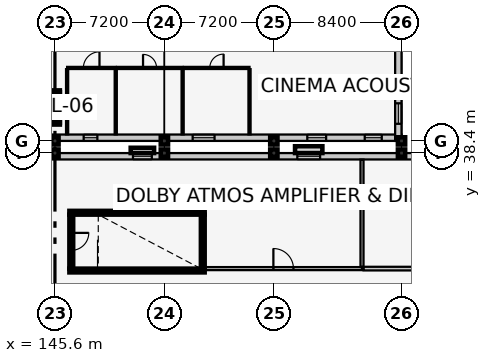
"""IFC4 building model, lengths in metres.
Left out: names, types, materials, properties, quantities, classifications, styles, units other than length and angle.
Written with IfcOpenShell. Run it as: python <this file> out.ifc"""

import sys

from ifc_helpers import new_model, si_unit, direction, frame, frame_2d, origin, origin_2d, place, context, subcontext, project, spatial, rectangle, extrude, element, fill, save


model = new_model("IFC4")
c1 = context("Model", 3, precision=1e-05, world=origin(), true_north=direction((0.0, 1.0)))
c2 = subcontext(c1, "Body", "Model", "MODEL_VIEW")
j1 = project(units=[si_unit("LENGTHUNIT", "METRE"), si_unit("PLANEANGLEUNIT", "RADIAN")], contexts=[c1])
p1 = place(None, origin())
s1 = spatial("IfcSite", under=j1, at=p1, CompositionType="ELEMENT")
p2 = place(p1, origin())
s2 = spatial("IfcBuilding", under=s1, at=p2, CompositionType="ELEMENT")
p3 = place(p2, frame((0.0, 0.0, 9.6)))
s3 = spatial("IfcBuildingStorey", under=s2, at=p3, CompositionType="ELEMENT", Elevation=9.6)
for number, where, z_axis, x_axis in (
    (1, (145.6, 38.4, 0.0), (0.0, 0.0, 1.0), (1.0, 0.0, 0.0)),
    (2, (152.8, 38.4, 0.0), (0.0, 0.0, 1.0), (1.0, 0.0, 0.0)),
    (3, (160.0, 38.4, 0.0), (0.0, 0.0, 1.0), (1.0, 0.0, 0.0)),
    (4, (168.4, 38.4, 0.0), (0.0, 0.0, 1.0), (1.0, 0.0, 0.0)),
    (5, (145.6, 39.2, 0.0), (0.0, 0.0, 1.0), (1.0, 0.0, 0.0)),
    (6, (152.8, 39.2, 0.0), (0.0, 0.0, 1.0), (1.0, 0.0, 0.0)),
    (7, (160.0, 39.2, 0.0), (0.0, 0.0, 1.0), (1.0, 0.0, 0.0)),
    (8, (168.4, 39.2, 0.0), (0.0, 0.0, 1.0), (1.0, 0.0, 0.0)),
):
    element("IfcColumn", number, at=place(p3, frame(where, z_axis=z_axis, x_axis=x_axis)), inside=s3, PredefinedType="COLUMN", context=c2, shape_type="SweptSolid", body=[
        extrude(rectangle(XDim=0.48, YDim=0.48, at=origin_2d()), origin(), (0.0, 0.0, 1.0), 4.2),
    ])
p4 = place(p3, frame((124.0, 38.19, 0.0), z_axis=(0.0, 0.0, 1.0), x_axis=(1.0, 0.0, 0.0)))
e9 = element("IfcWall", 9, at=p4, inside=s3, PredefinedType="SOLIDWALL", context=c2, shape_type="SweptSolid", body=[
    extrude(rectangle(XDim=62.0, YDim=0.42, at=frame_2d((31.0, 0.0))), origin(), (0.0, 0.0, 1.0), 3.675),
])
p5 = place(p4, frame((1.299, 0.0, 0.9)))
e10 = element("IfcOpeningElement", 10, at=p5, cuts=e9, PredefinedType="OPENING", context=c2, shape_type="SweptSolid", body=[
    extrude(rectangle(XDim=1.05, YDim=1.6, at=frame_2d((0.525, 0.8))), frame((0.0, 0.222, 0.0), z_axis=(0.0, -1.0, 0.0), x_axis=(1.0, 0.0, 0.0)), (0.0, 0.0, 1.0), 0.444),
])
p6 = place(p4, frame((4.896, 0.0, 0.9)))
e11 = element("IfcOpeningElement", 11, at=p6, cuts=e9, PredefinedType="OPENING", context=c2, shape_type="SweptSolid", body=[
    extrude(rectangle(XDim=1.15, YDim=1.6, at=frame_2d((0.575, 0.8))), frame((0.0, 0.222, 0.0), z_axis=(0.0, -1.0, 0.0), x_axis=(1.0, 0.0, 0.0)), (0.0, 0.0, 1.0), 0.444),
])
p7 = place(p4, frame((8.493, 0.0, 0.9)))
e12 = element("IfcOpeningElement", 12, at=p7, cuts=e9, PredefinedType="OPENING", context=c2, shape_type="SweptSolid", body=[
    extrude(rectangle(XDim=1.25, YDim=1.6, at=frame_2d((0.625, 0.8))), frame((0.0, 0.222, 0.0), z_axis=(0.0, -1.0, 0.0), x_axis=(1.0, 0.0, 0.0)), (0.0, 0.0, 1.0), 0.444),
])
p8 = place(p4, frame((12.075, 0.0, 0.9)))
e13 = element("IfcOpeningElement", 13, at=p8, cuts=e9, PredefinedType="OPENING", context=c2, shape_type="SweptSolid", body=[
    extrude(rectangle(XDim=1.38, YDim=1.6, at=frame_2d((0.69, 0.8))), frame((0.0, 0.222, 0.0), z_axis=(0.0, -1.0, 0.0), x_axis=(1.0, 0.0, 0.0)), (0.0, 0.0, 1.0), 0.444),
])
p9 = place(p4, frame((15.662, 0.0, 0.9)))
e14 = element("IfcOpeningElement", 14, at=p9, cuts=e9, PredefinedType="OPENING", context=c2, shape_type="SweptSolid", body=[
    extrude(rectangle(XDim=1.5, YDim=1.6, at=frame_2d((0.75, 0.8))), frame((0.0, 0.222, 0.0), z_axis=(0.0, -1.0, 0.0), x_axis=(1.0, 0.0, 0.0)), (0.0, 0.0, 1.0), 0.444),
])
p10 = place(p4, frame((19.559, 0.0, 0.9)))
e15 = element("IfcOpeningElement", 15, at=p10, cuts=e9, PredefinedType="OPENING", context=c2, shape_type="SweptSolid", body=[
    extrude(rectangle(XDim=1.0, YDim=1.75, at=frame_2d((0.5, 0.875))), frame((0.0, 0.222, 0.0), z_axis=(0.0, -1.0, 0.0), x_axis=(1.0, 0.0, 0.0)), (0.0, 0.0, 1.0), 0.444),
])
p11 = place(p4, frame((26.733, 0.0, 0.9)))
e16 = element("IfcOpeningElement", 16, at=p11, cuts=e9, PredefinedType="OPENING", context=c2, shape_type="SweptSolid", body=[
    extrude(rectangle(XDim=1.24, YDim=1.75, at=frame_2d((0.62, 0.875))), frame((0.0, 0.222, 0.0), z_axis=(0.0, -1.0, 0.0), x_axis=(1.0, 0.0, 0.0)), (0.0, 0.0, 1.0), 0.444),
])
p12 = place(p4, frame((37.544, 0.0, 0.9)))
e17 = element("IfcOpeningElement", 17, at=p12, cuts=e9, PredefinedType="OPENING", context=c2, shape_type="SweptSolid", body=[
    extrude(rectangle(XDim=1.5, YDim=1.75, at=frame_2d((0.75, 0.875))), frame((0.0, 0.222, 0.0), z_axis=(0.0, -1.0, 0.0), x_axis=(1.0, 0.0, 0.0)), (0.0, 0.0, 1.0), 0.444),
])
p13 = place(p4, frame((48.685, 0.0, 0.9)))
e18 = element("IfcOpeningElement", 18, at=p13, cuts=e9, PredefinedType="OPENING", context=c2, shape_type="SweptSolid", body=[
    extrude(rectangle(XDim=1.1, YDim=1.35, at=frame_2d((0.55, 0.675))), frame((0.0, 0.222, 0.0), z_axis=(0.0, -1.0, 0.0), x_axis=(1.0, 0.0, 0.0)), (0.0, 0.0, 1.0), 0.444),
])
p14 = place(p4, frame((59.477, 0.0, 0.9)))
e19 = element("IfcOpeningElement", 19, at=p14, cuts=e9, PredefinedType="OPENING", context=c2, shape_type="SweptSolid", body=[
    extrude(rectangle(XDim=1.4, YDim=1.35, at=frame_2d((0.7, 0.675))), frame((0.0, 0.222, 0.0), z_axis=(0.0, -1.0, 0.0), x_axis=(1.0, 0.0, 0.0)), (0.0, 0.0, 1.0), 0.444),
])
p15 = place(p3, frame((168.4, 39.41, 0.0), z_axis=(0.0, 0.0, 1.0), x_axis=(-1.0, 0.0, 0.0)))
e20 = element("IfcWall", 20, at=p15, inside=s3, PredefinedType="SOLIDWALL", context=c2, shape_type="SweptSolid", body=[
    extrude(rectangle(XDim=37.2, YDim=0.42, at=frame_2d((18.6, 0.0))), origin(), (0.0, 0.0, 1.0), 3.115),
])
p16 = place(p15, frame((1.3, 0.0, 0.9)))
e21 = element("IfcOpeningElement", 21, at=p16, cuts=e20, PredefinedType="OPENING", context=c2, shape_type="SweptSolid", body=[
    extrude(rectangle(XDim=1.12, YDim=1.75, at=frame_2d((0.56, 0.875))), frame((0.0, 0.222, 0.0), z_axis=(0.0, -1.0, 0.0), x_axis=(1.0, 0.0, 0.0)), (0.0, 0.0, 1.0), 0.444),
])
p17 = place(p15, frame((4.96, 0.0, 0.9)))
e22 = element("IfcOpeningElement", 22, at=p17, cuts=e20, PredefinedType="OPENING", context=c2, shape_type="SweptSolid", body=[
    extrude(rectangle(XDim=1.24, YDim=1.75, at=frame_2d((0.62, 0.875))), frame((0.0, 0.222, 0.0), z_axis=(0.0, -1.0, 0.0), x_axis=(1.0, 0.0, 0.0)), (0.0, 0.0, 1.0), 0.444),
])
p18 = place(p15, frame((12.3, 0.0, 0.9)))
e23 = element("IfcOpeningElement", 23, at=p18, cuts=e20, PredefinedType="OPENING", context=c2, shape_type="SweptSolid", body=[
    extrude(rectangle(XDim=1.44, YDim=1.75, at=frame_2d((0.72, 0.875))), frame((0.0, 0.222, 0.0), z_axis=(0.0, -1.0, 0.0), x_axis=(1.0, 0.0, 0.0)), (0.0, 0.0, 1.0), 0.444),
])
p19 = place(p15, frame((20.01, 0.0, 0.9)))
e24 = element("IfcOpeningElement", 24, at=p19, cuts=e20, PredefinedType="OPENING", context=c2, shape_type="SweptSolid", body=[
    extrude(rectangle(XDim=0.9, YDim=1.35, at=frame_2d((0.45, 0.675))), frame((0.0, 0.222, 0.0), z_axis=(0.0, -1.0, 0.0), x_axis=(1.0, 0.0, 0.0)), (0.0, 0.0, 1.0), 0.444),
])
p20 = place(p15, frame((23.68, 0.0, 0.9)))
e25 = element("IfcOpeningElement", 25, at=p20, cuts=e20, PredefinedType="OPENING", context=c2, shape_type="SweptSolid", body=[
    extrude(rectangle(XDim=1.0, YDim=1.35, at=frame_2d((0.5, 0.675))), frame((0.0, 0.222, 0.0), z_axis=(0.0, -1.0, 0.0), x_axis=(1.0, 0.0, 0.0)), (0.0, 0.0, 1.0), 0.444),
])
p21 = place(p15, frame((27.35, 0.0, 0.9)))
e26 = element("IfcOpeningElement", 26, at=p21, cuts=e20, PredefinedType="OPENING", context=c2, shape_type="SweptSolid", body=[
    extrude(rectangle(XDim=1.1, YDim=1.35, at=frame_2d((0.55, 0.675))), frame((0.0, 0.222, 0.0), z_axis=(0.0, -1.0, 0.0), x_axis=(1.0, 0.0, 0.0)), (0.0, 0.0, 1.0), 0.444),
])
p22 = place(p15, frame((31.02, 0.0, 0.9)))
e27 = element("IfcOpeningElement", 27, at=p22, cuts=e20, PredefinedType="OPENING", context=c2, shape_type="SweptSolid", body=[
    extrude(rectangle(XDim=1.2, YDim=1.35, at=frame_2d((0.6, 0.675))), frame((0.0, 0.222, 0.0), z_axis=(0.0, -1.0, 0.0), x_axis=(1.0, 0.0, 0.0)), (0.0, 0.0, 1.0), 0.444),
])
p23 = place(p15, frame((34.69, 0.0, 0.9)))
e28 = element("IfcOpeningElement", 28, at=p23, cuts=e20, PredefinedType="OPENING", context=c2, shape_type="SweptSolid", body=[
    extrude(rectangle(XDim=1.3, YDim=1.35, at=frame_2d((0.65, 0.675))), frame((0.0, 0.222, 0.0), z_axis=(0.0, -1.0, 0.0), x_axis=(1.0, 0.0, 0.0)), (0.0, 0.0, 1.0), 0.444),
])
p24 = place(p3, frame((168.19, 60.8, 0.0), z_axis=(0.0, 0.0, 1.0), x_axis=(0.0, -1.0, 0.0)))
e29 = element("IfcWall", 29, at=p24, inside=s3, PredefinedType="SOLIDWALL", context=c2, shape_type="SweptSolid", body=[
    extrude(rectangle(XDim=21.6, YDim=0.42, at=frame_2d((10.8, 0.0))), origin(), (0.0, 0.0, 1.0), 3.355),
])
p25 = place(p24, frame((1.1, 0.0, 0.9)))
e30 = element("IfcOpeningElement", 30, at=p25, cuts=e29, PredefinedType="OPENING", context=c2, shape_type="SweptSolid", body=[
    extrude(rectangle(XDim=1.4, YDim=1.35, at=frame_2d((0.7, 0.675))), frame((0.0, 0.222, 0.0), z_axis=(0.0, -1.0, 0.0), x_axis=(1.0, 0.0, 0.0)), (0.0, 0.0, 1.0), 0.444),
])
p26 = place(p24, frame((4.925, 0.0, 0.9)))
e31 = element("IfcOpeningElement", 31, at=p26, cuts=e29, PredefinedType="OPENING", context=c2, shape_type="SweptSolid", body=[
    extrude(rectangle(XDim=0.95, YDim=1.45, at=frame_2d((0.475, 0.725))), frame((0.0, 0.222, 0.0), z_axis=(0.0, -1.0, 0.0), x_axis=(1.0, 0.0, 0.0)), (0.0, 0.0, 1.0), 0.444),
])
p27 = place(p24, frame((8.475, 0.0, 0.9)))
e32 = element("IfcOpeningElement", 32, at=p27, cuts=e29, PredefinedType="OPENING", context=c2, shape_type="SweptSolid", body=[
    extrude(rectangle(XDim=1.05, YDim=1.45, at=frame_2d((0.525, 0.725))), frame((0.0, 0.222, 0.0), z_axis=(0.0, -1.0, 0.0), x_axis=(1.0, 0.0, 0.0)), (0.0, 0.0, 1.0), 0.444),
])
p28 = place(p24, frame((12.025, 0.0, 0.9)))
e33 = element("IfcOpeningElement", 33, at=p28, cuts=e29, PredefinedType="OPENING", context=c2, shape_type="SweptSolid", body=[
    extrude(rectangle(XDim=1.15, YDim=1.45, at=frame_2d((0.575, 0.725))), frame((0.0, 0.222, 0.0), z_axis=(0.0, -1.0, 0.0), x_axis=(1.0, 0.0, 0.0)), (0.0, 0.0, 1.0), 0.444),
])
p29 = place(p24, frame((19.125, 0.0, 0.9)))
e34 = element("IfcOpeningElement", 34, at=p29, cuts=e29, PredefinedType="OPENING", context=c2, shape_type="SweptSolid", body=[
    extrude(rectangle(XDim=1.35, YDim=1.45, at=frame_2d((0.675, 0.725))), frame((0.0, 0.222, 0.0), z_axis=(0.0, -1.0, 0.0), x_axis=(1.0, 0.0, 0.0)), (0.0, 0.0, 1.0), 0.444),
])
for number, where, z_axis, x_axis in (
    (35, (146.55, 30.675, 0.0), (0.0, 0.0, 1.0), (1.0, 0.0, 0.0)),
    (36, (155.45, 34.475, 0.0), (0.0, 0.0, 1.0), (-1.0, 0.0, 0.0)),
):
    element("IfcWall", number, at=place(p3, frame(where, z_axis=z_axis, x_axis=x_axis)), inside=s3, PredefinedType="SHEAR", context=c2, shape_type="SweptSolid", body=[
        extrude(rectangle(XDim=8.9, YDim=0.25, at=frame_2d((4.45, 0.0))), origin(), (0.0, 0.0, 1.0), 3.95),
    ])
p30 = place(p3, frame((146.675, 34.35, 0.0), z_axis=(0.0, 0.0, 1.0), x_axis=(0.0, -1.0, 0.0)))
e37 = element("IfcWall", 37, at=p30, inside=s3, PredefinedType="SHEAR", context=c2, shape_type="SweptSolid", body=[
    extrude(rectangle(XDim=3.55, YDim=0.25, at=frame_2d((1.775, 0.0))), origin(), (0.0, 0.0, 1.0), 3.95),
])
p31 = place(p30, frame((1.2, 0.0, 0.0)))
e38 = element("IfcOpeningElement", 38, at=p31, cuts=e37, PredefinedType="OPENING", context=c2, shape_type="SweptSolid", body=[
    extrude(rectangle(XDim=1.15, YDim=2.15, at=frame_2d((0.575, 1.075))), frame((0.0, 0.137, 0.0), z_axis=(0.0, -1.0, 0.0), x_axis=(1.0, 0.0, 0.0)), (0.0, 0.0, 1.0), 0.274),
])
p32 = place(p3, frame((155.325, 30.8, 0.0), z_axis=(0.0, 0.0, 1.0), x_axis=(0.0, 1.0, 0.0)))
e39 = element("IfcWall", 39, at=p32, inside=s3, PredefinedType="SHEAR", context=c2, shape_type="SweptSolid", body=[
    extrude(rectangle(XDim=3.55, YDim=0.25, at=frame_2d((1.775, 0.0))), origin(), (0.0, 0.0, 1.0), 3.95),
])
p33 = place(p3, frame((143.875, 40.4, 0.0), z_axis=(0.0, 0.0, 1.0), x_axis=(1.0, 0.0, 0.0)))
e40 = element("IfcWall", 40, at=p33, inside=s3, PredefinedType="SHEAR", context=c2, shape_type="SweptSolid", body=[
    extrude(rectangle(XDim=2.05, YDim=0.25, at=frame_2d((1.025, 0.0))), origin(), (0.0, 0.0, 1.0), 3.96),
])
p34 = place(p3, frame((145.925, 42.4, 0.0), z_axis=(0.0, 0.0, 1.0), x_axis=(-1.0, 0.0, 0.0)))
e41 = element("IfcWall", 41, at=p34, inside=s3, PredefinedType="SHEAR", context=c2, shape_type="SweptSolid", body=[
    extrude(rectangle(XDim=2.05, YDim=0.25, at=frame_2d((1.025, 0.0))), origin(), (0.0, 0.0, 1.0), 3.96),
])
p35 = place(p34, frame((0.55, 0.0, 0.0)))
e42 = element("IfcOpeningElement", 42, at=p35, cuts=e41, PredefinedType="OPENING", context=c2, shape_type="SweptSolid", body=[
    extrude(rectangle(XDim=0.95, YDim=2.1, at=frame_2d((0.475, 1.05))), frame((0.0, 0.137, 0.0), z_axis=(0.0, -1.0, 0.0), x_axis=(1.0, 0.0, 0.0)), (0.0, 0.0, 1.0), 0.274),
])
p36 = place(p3, frame((145.8, 40.4, 0.0), z_axis=(0.0, 0.0, 1.0), x_axis=(0.0, 1.0, 0.0)))
e43 = element("IfcWall", 43, at=p36, inside=s3, PredefinedType="SHEAR", context=c2, shape_type="SweptSolid", body=[
    extrude(rectangle(XDim=2.0, YDim=0.25, at=frame_2d((1.0, 0.0))), origin(), (0.0, 0.0, 1.0), 3.96),
])
p37 = place(p3, frame((155.46, 30.8, 0.0), z_axis=(0.0, 0.0, 1.0), x_axis=(1.0, 0.0, 0.0)))
e44 = element("IfcWall", 44, at=p37, inside=s3, PredefinedType="PARTITIONING", context=c2, shape_type="SweptSolid", body=[
    extrude(rectangle(XDim=10.34, YDim=0.2, at=frame_2d((5.17, 0.0))), origin(), (0.0, 0.0, 1.0), 3.95),
])
p38 = place(p37, frame((4.51, 0.0, 0.0)))
e45 = element("IfcOpeningElement", 45, at=p38, cuts=e44, PredefinedType="OPENING", context=c2, shape_type="SweptSolid", body=[
    extrude(rectangle(XDim=1.32, YDim=2.15, at=frame_2d((0.66, 1.075))), frame((0.0, 0.112, 0.0), z_axis=(0.0, -1.0, 0.0), x_axis=(1.0, 0.0, 0.0)), (0.0, 0.0, 1.0), 0.224),
])
p39 = place(p3, frame((165.8, 30.91, 0.0), z_axis=(0.0, 0.0, 1.0), x_axis=(0.0, 1.0, 0.0)))
e46 = element("IfcWall", 46, at=p39, inside=s3, PredefinedType="PARTITIONING", context=c2, shape_type="SweptSolid", body=[
    extrude(rectangle(XDim=7.06, YDim=0.2, at=frame_2d((3.53, 0.0))), origin(), (0.0, 0.0, 1.0), 3.95),
])
p40 = place(p3, frame((165.91, 30.8, 0.0), z_axis=(0.0, 0.0, 1.0), x_axis=(1.0, 0.0, 0.0)))
e47 = element("IfcWall", 47, at=p40, inside=s3, PredefinedType="PARTITIONING", context=c2, shape_type="SweptSolid", body=[
    extrude(rectangle(XDim=10.49, YDim=0.24, at=frame_2d((5.245, 0.0))), origin(), (0.0, 0.0, 1.0), 3.95),
])
p41 = place(p40, frame((4.525, 0.0, 0.0)))
e48 = element("IfcOpeningElement", 48, at=p41, cuts=e47, PredefinedType="OPENING", context=c2, shape_type="SweptSolid", body=[
    extrude(rectangle(XDim=1.44, YDim=2.2, at=frame_2d((0.72, 1.1))), frame((0.0, 0.132, 0.0), z_axis=(0.0, -1.0, 0.0), x_axis=(1.0, 0.0, 0.0)), (0.0, 0.0, 1.0), 0.264),
])
p42 = place(p3, frame((146.4, 44.0, 0.0), z_axis=(0.0, 0.0, 1.0), x_axis=(1.0, 0.0, 0.0)))
e49 = element("IfcWall", 49, at=p42, inside=s3, PredefinedType="PARTITIONING", context=c2, shape_type="SweptSolid", body=[
    extrude(rectangle(XDim=3.2, YDim=0.14, at=frame_2d((1.6, 0.0))), origin(), (0.0, 0.0, 1.0), 3.96),
])
p43 = place(p42, frame((1.07, 0.0, 0.0)))
e50 = element("IfcOpeningElement", 50, at=p43, cuts=e49, PredefinedType="OPENING", context=c2, shape_type="SweptSolid", body=[
    extrude(rectangle(XDim=1.06, YDim=2.1, at=frame_2d((0.53, 1.05))), frame((0.0, 0.082, 0.0), z_axis=(0.0, -1.0, 0.0), x_axis=(1.0, 0.0, 0.0)), (0.0, 0.0, 1.0), 0.164),
])
for number, where, z_axis, x_axis in (
    (51, (146.4, 39.63, 0.0), (0.0, 0.0, 1.0), (0.0, 1.0, 0.0)),
    (52, (149.6, 39.63, 0.0), (0.0, 0.0, 1.0), (0.0, 1.0, 0.0)),
):
    element("IfcWall", number, at=place(p3, frame(where, z_axis=z_axis, x_axis=x_axis)), inside=s3, PredefinedType="PARTITIONING", context=c2, shape_type="SweptSolid", body=[
        extrude(rectangle(XDim=4.29, YDim=0.14, at=frame_2d((2.145, 0.0))), origin(), (0.0, 0.0, 1.0), 3.96),
    ])
p44 = place(p3, frame((149.68, 44.0, 0.0), z_axis=(0.0, 0.0, 1.0), x_axis=(1.0, 0.0, 0.0)))
e53 = element("IfcWall", 53, at=p44, inside=s3, PredefinedType="PARTITIONING", context=c2, shape_type="SweptSolid", body=[
    extrude(rectangle(XDim=4.32, YDim=0.14, at=frame_2d((2.16, 0.0))), origin(), (0.0, 0.0, 1.0), 3.96),
])
p45 = place(p44, frame((1.715, 0.0, 0.0)))
e54 = element("IfcOpeningElement", 54, at=p45, cuts=e53, PredefinedType="OPENING", context=c2, shape_type="SweptSolid", body=[
    extrude(rectangle(XDim=0.89, YDim=2.05, at=frame_2d((0.445, 1.025))), frame((0.0, 0.082, 0.0), z_axis=(0.0, -1.0, 0.0), x_axis=(1.0, 0.0, 0.0)), (0.0, 0.0, 1.0), 0.164),
])
p46 = place(p3, frame((154.0, 39.63, 0.0), z_axis=(0.0, 0.0, 1.0), x_axis=(0.0, 1.0, 0.0)))
e55 = element("IfcWall", 55, at=p46, inside=s3, PredefinedType="PARTITIONING", context=c2, shape_type="SweptSolid", body=[
    extrude(rectangle(XDim=4.29, YDim=0.14, at=frame_2d((2.145, 0.0))), origin(), (0.0, 0.0, 1.0), 3.96),
])
p47 = place(p3, frame((154.08, 44.0, 0.0), z_axis=(0.0, 0.0, 1.0), x_axis=(1.0, 0.0, 0.0)))
e56 = element("IfcWall", 56, at=p47, inside=s3, PredefinedType="PARTITIONING", context=c2, shape_type="SweptSolid", body=[
    extrude(rectangle(XDim=4.32, YDim=0.14, at=frame_2d((2.16, 0.0))), origin(), (0.0, 0.0, 1.0), 3.96),
])
p48 = place(p47, frame((1.705, 0.0, 0.0)))
e57 = element("IfcOpeningElement", 57, at=p48, cuts=e56, PredefinedType="OPENING", context=c2, shape_type="SweptSolid", body=[
    extrude(rectangle(XDim=0.91, YDim=2.06, at=frame_2d((0.455, 1.03))), frame((0.0, 0.082, 0.0), z_axis=(0.0, -1.0, 0.0), x_axis=(1.0, 0.0, 0.0)), (0.0, 0.0, 1.0), 0.164),
])
p49 = place(p3, frame((158.4, 39.63, 0.0), z_axis=(0.0, 0.0, 1.0), x_axis=(0.0, 1.0, 0.0)))
e58 = element("IfcWall", 58, at=p49, inside=s3, PredefinedType="PARTITIONING", context=c2, shape_type="SweptSolid", body=[
    extrude(rectangle(XDim=4.29, YDim=0.14, at=frame_2d((2.145, 0.0))), origin(), (0.0, 0.0, 1.0), 3.96),
])
p50 = place(p11, origin())
e59 = element("IfcWindow", 59, at=p50, inside=s3, PartitioningType="SINGLE_PANEL", PredefinedType="WINDOW", context=c2, shape_type="SweptSolid", body=[
    extrude(rectangle(XDim=1.24, YDim=1.75, at=frame_2d((0.62, 0.875))), frame((0.0, 0.03, 0.0), z_axis=(0.0, -1.0, 0.0), x_axis=(1.0, 0.0, 0.0)), (0.0, 0.0, 1.0), 0.06),
])
fill(e16, e59)
p51 = place(p12, origin())
e60 = element("IfcWindow", 60, at=p51, inside=s3, PartitioningType="SINGLE_PANEL", PredefinedType="WINDOW", context=c2, shape_type="SweptSolid", body=[
    extrude(rectangle(XDim=1.5, YDim=1.75, at=frame_2d((0.75, 0.875))), frame((0.0, 0.03, 0.0), z_axis=(0.0, -1.0, 0.0), x_axis=(1.0, 0.0, 0.0)), (0.0, 0.0, 1.0), 0.06),
])
fill(e17, e60)
p52 = place(p16, origin())
e61 = element("IfcWindow", 61, at=p52, inside=s3, PartitioningType="SINGLE_PANEL", PredefinedType="WINDOW", context=c2, shape_type="SweptSolid", body=[
    extrude(rectangle(XDim=1.12, YDim=1.75, at=frame_2d((0.56, 0.875))), frame((0.0, 0.03, 0.0), z_axis=(0.0, -1.0, 0.0), x_axis=(1.0, 0.0, 0.0)), (0.0, 0.0, 1.0), 0.06),
])
fill(e21, e61)
p53 = place(p17, origin())
e62 = element("IfcWindow", 62, at=p53, inside=s3, PartitioningType="SINGLE_PANEL", PredefinedType="WINDOW", context=c2, shape_type="SweptSolid", body=[
    extrude(rectangle(XDim=1.24, YDim=1.75, at=frame_2d((0.62, 0.875))), frame((0.0, 0.03, 0.0), z_axis=(0.0, -1.0, 0.0), x_axis=(1.0, 0.0, 0.0)), (0.0, 0.0, 1.0), 0.06),
])
fill(e22, e62)
p54 = place(p18, origin())
e63 = element("IfcWindow", 63, at=p54, inside=s3, PartitioningType="SINGLE_PANEL", PredefinedType="WINDOW", context=c2, shape_type="SweptSolid", body=[
    extrude(rectangle(XDim=1.44, YDim=1.75, at=frame_2d((0.72, 0.875))), frame((0.0, 0.03, 0.0), z_axis=(0.0, -1.0, 0.0), x_axis=(1.0, 0.0, 0.0)), (0.0, 0.0, 1.0), 0.06),
])
fill(e23, e63)
p55 = place(p19, origin())
e64 = element("IfcWindow", 64, at=p55, inside=s3, PartitioningType="SINGLE_PANEL", PredefinedType="WINDOW", context=c2, shape_type="SweptSolid", body=[
    extrude(rectangle(XDim=0.9, YDim=1.35, at=frame_2d((0.45, 0.675))), frame((0.0, 0.03, 0.0), z_axis=(0.0, -1.0, 0.0), x_axis=(1.0, 0.0, 0.0)), (0.0, 0.0, 1.0), 0.06),
])
fill(e24, e64)
p56 = place(p29, origin())
e65 = element("IfcWindow", 65, at=p56, inside=s3, PartitioningType="SINGLE_PANEL", PredefinedType="WINDOW", context=c2, shape_type="SweptSolid", body=[
    extrude(rectangle(XDim=1.35, YDim=1.45, at=frame_2d((0.675, 0.725))), frame((0.0, 0.03, 0.0), z_axis=(0.0, -1.0, 0.0), x_axis=(1.0, 0.0, 0.0)), (0.0, 0.0, 1.0), 0.06),
])
fill(e34, e65)
p57 = place(p31, origin())
e66 = element("IfcDoor", 66, at=p57, inside=s3, OperationType="SINGLE_SWING_LEFT", PredefinedType="DOOR", context=c2, shape_type="SweptSolid", body=[
    extrude(rectangle(XDim=1.15, YDim=2.15, at=frame_2d((0.575, 1.075))), frame((0.0, 0.025, 0.0), z_axis=(0.0, -1.0, 0.0), x_axis=(1.0, 0.0, 0.0)), (0.0, 0.0, 1.0), 0.05),
])
fill(e38, e66)
p58 = place(p38, origin())
e67 = element("IfcDoor", 67, at=p58, inside=s3, OperationType="SINGLE_SWING_LEFT", PredefinedType="DOOR", context=c2, shape_type="SweptSolid", body=[
    extrude(rectangle(XDim=1.32, YDim=2.15, at=frame_2d((0.66, 1.075))), frame((0.0, 0.025, 0.0), z_axis=(0.0, -1.0, 0.0), x_axis=(1.0, 0.0, 0.0)), (0.0, 0.0, 1.0), 0.05),
])
fill(e45, e67)
p59 = place(p43, origin())
e68 = element("IfcDoor", 68, at=p59, inside=s3, OperationType="SINGLE_SWING_RIGHT", PredefinedType="DOOR", context=c2, shape_type="SweptSolid", body=[
    extrude(rectangle(XDim=1.06, YDim=2.1, at=frame_2d((0.53, 1.05))), frame((0.0, 0.025, 0.0), z_axis=(0.0, -1.0, 0.0), x_axis=(1.0, 0.0, 0.0)), (0.0, 0.0, 1.0), 0.05),
])
fill(e50, e68)
p60 = place(p45, origin())
e69 = element("IfcDoor", 69, at=p60, inside=s3, OperationType="SINGLE_SWING_LEFT", PredefinedType="DOOR", context=c2, shape_type="SweptSolid", body=[
    extrude(rectangle(XDim=0.89, YDim=2.05, at=frame_2d((0.445, 1.025))), frame((0.0, 0.025, 0.0), z_axis=(0.0, -1.0, 0.0), x_axis=(1.0, 0.0, 0.0)), (0.0, 0.0, 1.0), 0.05),
])
fill(e54, e69)
p61 = place(p48, origin())
e70 = element("IfcDoor", 70, at=p61, inside=s3, OperationType="SINGLE_SWING_RIGHT", PredefinedType="DOOR", context=c2, shape_type="SweptSolid", body=[
    extrude(rectangle(XDim=0.91, YDim=2.06, at=frame_2d((0.455, 1.03))), frame((0.0, 0.025, 0.0), z_axis=(0.0, -1.0, 0.0), x_axis=(1.0, 0.0, 0.0)), (0.0, 0.0, 1.0), 0.05),
])
fill(e57, e70)
save(model, sys.argv[1])
